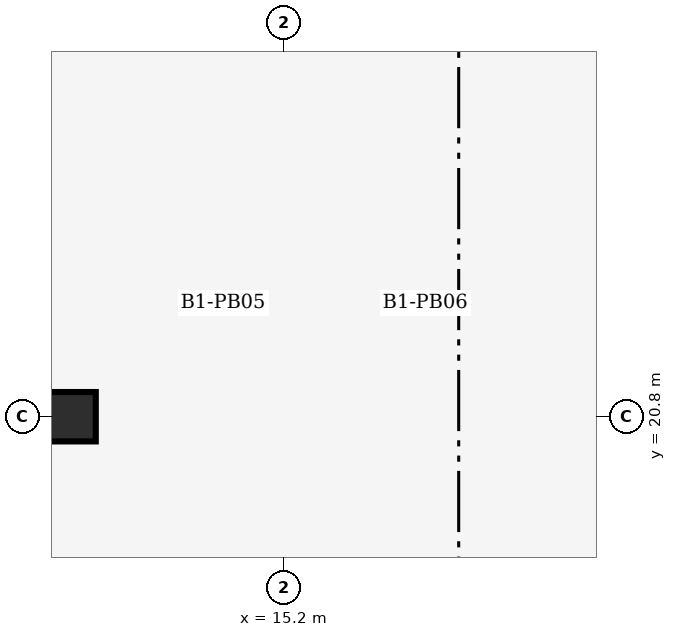
"""IFC4 building model, lengths in metres.
Left out: names, types, materials, properties, quantities, classifications, styles, units other than length and angle.
Written with IfcOpenShell. Run it as: python <this file> out.ifc"""

import sys

from ifc_helpers import new_model, si_unit, direction, frame, origin, origin_2d, place, context, subcontext, project, spatial, rectangle, extrude, element, save


model = new_model("IFC4")
c1 = context("Model", 3, precision=1e-05, world=origin(), true_north=direction((0.0, 1.0)))
c2 = subcontext(c1, "Body", "Model", "MODEL_VIEW")
j1 = project(units=[si_unit("LENGTHUNIT", "METRE"), si_unit("PLANEANGLEUNIT", "RADIAN")], contexts=[c1])
p1 = place(None, origin())
s1 = spatial("IfcSite", under=j1, at=p1, CompositionType="ELEMENT")
p2 = place(p1, origin())
s2 = spatial("IfcBuilding", under=s1, at=p2, CompositionType="ELEMENT")
p3 = place(p2, frame((0.0, 0.0, -4.8)))
s3 = spatial("IfcBuildingStorey", under=s2, at=p3, CompositionType="ELEMENT", Elevation=-4.8)
p4 = place(p3, frame((12.4, 20.8, 0.0), z_axis=(0.0, 0.0, 1.0), x_axis=(1.0, 0.0, 0.0)))
e1 = element("IfcColumn", 1, at=p4, inside=s3, PredefinedType="COLUMN", context=c2, shape_type="SweptSolid", body=[
    extrude(rectangle(XDim=0.65, YDim=0.65, at=origin_2d()), origin(), (0.0, 0.0, 1.0), 4.8),
])
save(model, sys.argv[1])
